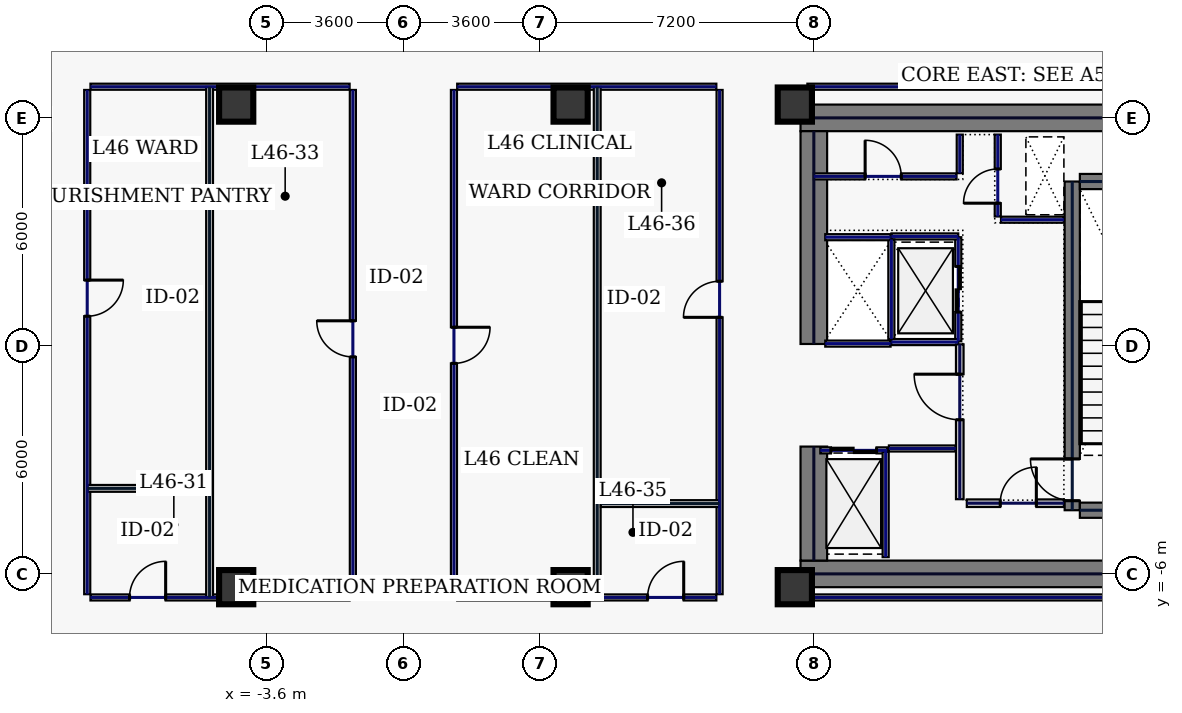
"""IFC4 building model, lengths in metres.
Left out: names, types, materials, properties, quantities, classifications, styles, units other than length and angle.
Written with IfcOpenShell. Run it as: python <this file> out.ifc"""

import sys

from ifc_helpers import new_model, si_unit, direction, frame, frame_2d, origin, origin_2d, place, context, subcontext, project, spatial, rectangle, hollow_rectangle, extrude, element, fill, save


model = new_model("IFC4")
c1 = context("Model", 3, precision=1e-05, world=origin(), true_north=direction((0.0, 1.0)))
c2 = subcontext(c1, "Body", "Model", "MODEL_VIEW")
j1 = project(units=[si_unit("LENGTHUNIT", "METRE"), si_unit("PLANEANGLEUNIT", "RADIAN")], contexts=[c1])
p1 = place(None, origin())
s1 = spatial("IfcSite", under=j1, at=p1, CompositionType="ELEMENT")
p2 = place(p1, origin())
s2 = spatial("IfcBuilding", under=s1, at=p2, CompositionType="ELEMENT")
p3 = place(p2, frame((0.0, 0.0, 200.2)))
s3 = spatial("IfcBuildingStorey", under=s2, at=p3, CompositionType="ELEMENT", Elevation=200.2)
for number, where, z_axis, x_axis in (
    (1, (10.45, 6.0, 0.0), (0.0, 0.0, 1.0), (1.0, 0.0, 0.0)),
    (2, (10.45, -6.0, 0.0), (0.0, 0.0, 1.0), (1.0, 0.0, 0.0)),
):
    element("IfcWall", number, at=place(p3, frame(where, z_axis=z_axis, x_axis=x_axis)), inside=s3, PredefinedType="SHEAR", context=c2, shape_type="SweptSolid", body=[
        extrude(rectangle(XDim=11.55, YDim=0.7, at=frame_2d((5.775, 0.0))), origin(), (0.0, 0.0, 1.0), 3.74),
    ])
p4 = place(p3, frame((10.8, -5.65, 0.0), z_axis=(0.0, 0.0, 1.0), x_axis=(0.0, 1.0, 0.0)))
e3 = element("IfcWall", 3, at=p4, inside=s3, PredefinedType="SHEAR", context=c2, shape_type="SweptSolid", body=[
    extrude(rectangle(XDim=3.0, YDim=0.7, at=frame_2d((1.5, 0.0))), origin(), (0.0, 0.0, 1.0), 3.74),
])
p5 = place(p3, frame((10.8, 0.05, 0.0), z_axis=(0.0, 0.0, 1.0), x_axis=(0.0, 1.0, 0.0)))
e4 = element("IfcWall", 4, at=p5, inside=s3, PredefinedType="SHEAR", context=c2, shape_type="SweptSolid", body=[
    extrude(rectangle(XDim=5.6, YDim=0.7, at=frame_2d((2.8, 0.0))), origin(), (0.0, 0.0, 1.0), 3.74),
])
p6 = place(p3, frame((17.6, -4.325, 0.0), z_axis=(0.0, 0.0, 1.0), x_axis=(0.0, 1.0, 0.0)))
e5 = element("IfcWall", 5, at=p6, inside=s3, PredefinedType="SHEAR", context=c2, shape_type="SweptSolid", body=[
    extrude(rectangle(XDim=8.65, YDim=0.4, at=frame_2d((4.325, 0.0))), origin(), (0.0, 0.0, 1.0), 3.74),
])
p7 = place(p6, frame((0.25, 0.0, 0.0)))
e6 = element("IfcOpeningElement", 6, at=p7, cuts=e5, PredefinedType="OPENING", context=c2, shape_type="SweptSolid", body=[
    extrude(rectangle(XDim=1.1, YDim=2.2, at=frame_2d((0.55, 1.1))), frame((0.0, 0.21, 0.0), z_axis=(0.0, -1.0, 0.0), x_axis=(1.0, 0.0, 0.0)), (0.0, 0.0, 1.0), 0.42),
])
for number, where, z_axis, x_axis in (
    (7, (17.8, -4.325, 0.0), (0.0, 0.0, 1.0), (1.0, 0.0, 0.0)),
    (8, (17.8, 4.325, 0.0), (0.0, 0.0, 1.0), (1.0, 0.0, 0.0)),
):
    element("IfcWall", number, at=place(p3, frame(where, z_axis=z_axis, x_axis=x_axis)), inside=s3, PredefinedType="SHEAR", context=c2, shape_type="SweptSolid", body=[
        extrude(rectangle(XDim=3.4, YDim=0.4, at=frame_2d((1.7, 0.0))), origin(), (0.0, 0.0, 1.0), 3.74),
    ])
for number, where, z_axis, x_axis in (
    (9, (10.3, -6.35, 0.0), (0.0, 0.0, 1.0), (1.0, 0.0, 0.0)),
    (10, (10.3, 6.35, 0.0), (0.0, 0.0, 1.0), (1.0, 0.0, 0.0)),
    (11, (-4.4, -6.35, 0.0), (0.0, 0.0, 1.0), (1.0, 0.0, 0.0)),
    (12, (4.4, -6.35, 0.0), (0.0, 0.0, 1.0), (1.0, 0.0, 0.0)),
    (13, (-4.4, 6.35, 0.0), (0.0, 0.0, 1.0), (1.0, 0.0, 0.0)),
    (14, (4.4, 6.35, 0.0), (0.0, 0.0, 1.0), (1.0, 0.0, 0.0)),
):
    element("IfcColumn", number, at=place(p3, frame(where, z_axis=z_axis, x_axis=x_axis)), inside=s3, PredefinedType="COLUMN", context=c2, shape_type="SweptSolid", body=[
        extrude(hollow_rectangle(XDim=0.9, YDim=0.9, WallThickness=0.04, at=origin_2d()), origin(), (0.0, 0.0, 1.0), 3.74),
    ])
p8 = place(p3, frame((14.6, 0.12, 0.0), z_axis=(0.0, 0.0, 1.0), x_axis=(0.0, 1.0, 0.0)))
e15 = element("IfcWall", 15, at=p8, inside=s3, PredefinedType="PARTITIONING", context=c2, shape_type="SweptSolid", body=[
    extrude(rectangle(XDim=2.74, YDim=0.16, at=frame_2d((1.37, 0.0))), origin(), (0.0, 0.0, 1.0), 3.74),
])
p9 = place(p8, frame((0.77, 0.0, 0.0)))
e16 = element("IfcOpeningElement", 16, at=p9, cuts=e15, PredefinedType="OPENING", context=c2, shape_type="SweptSolid", body=[
    extrude(rectangle(XDim=1.2, YDim=2.2, at=frame_2d((0.6, 1.1))), frame((0.0, 0.09, 0.0), z_axis=(0.0, -1.0, 0.0), x_axis=(1.0, 0.0, 0.0)), (0.0, 0.0, 1.0), 0.18),
])
for number, where, z_axis, x_axis in (
    (17, (12.84, 0.1, 0.0), (0.0, 0.0, 1.0), (1.0, 0.0, 0.0)),
    (18, (12.84, 2.88, 0.0), (0.0, 0.0, 1.0), (1.0, 0.0, 0.0)),
):
    element("IfcWall", number, at=place(p3, frame(where, z_axis=z_axis, x_axis=x_axis)), inside=s3, PredefinedType="PARTITIONING", context=c2, shape_type="SweptSolid", body=[
        extrude(rectangle(XDim=1.76, YDim=0.16, at=frame_2d((0.88, 0.0))), origin(), (0.0, 0.0, 1.0), 3.74),
    ])
p10 = place(p3, frame((12.84, 0.18, 0.0), z_axis=(0.0, 0.0, 1.0), x_axis=(0.0, 1.0, 0.0)))
e19 = element("IfcWall", 19, at=p10, inside=s3, PredefinedType="PARTITIONING", context=c2, shape_type="SweptSolid", body=[
    extrude(rectangle(XDim=2.62, YDim=0.16, at=frame_2d((1.31, 0.0))), origin(), (0.0, 0.0, 1.0), 3.74),
])
p11 = place(p3, frame((10.97, -2.75, 0.0), z_axis=(0.0, 0.0, 1.0), x_axis=(1.0, 0.0, 0.0)))
e20 = element("IfcWall", 20, at=p11, inside=s3, PredefinedType="PARTITIONING", context=c2, shape_type="SweptSolid", body=[
    extrude(rectangle(XDim=1.76, YDim=0.16, at=frame_2d((0.88, 0.0))), origin(), (0.0, 0.0, 1.0), 3.74),
])
p12 = place(p11, frame((0.28, 0.0, 0.0)))
e21 = element("IfcOpeningElement", 21, at=p12, cuts=e20, PredefinedType="OPENING", context=c2, shape_type="SweptSolid", body=[
    extrude(rectangle(XDim=1.2, YDim=2.2, at=frame_2d((0.6, 1.1))), frame((0.0, 0.09, 0.0), z_axis=(0.0, -1.0, 0.0), x_axis=(1.0, 0.0, 0.0)), (0.0, 0.0, 1.0), 0.18),
])
for number, where, z_axis, x_axis in (
    (22, (11.1, 0.06, 0.0), (0.0, 0.0, 1.0), (1.0, 0.0, 0.0)),
    (23, (11.1, 2.86, 0.0), (0.0, 0.0, 1.0), (1.0, 0.0, 0.0)),
):
    element("IfcWall", number, at=place(p3, frame(where, z_axis=z_axis, x_axis=x_axis)), inside=s3, PredefinedType="PARTITIONING", context=c2, shape_type="SweptSolid", body=[
        extrude(rectangle(XDim=1.72, YDim=0.16, at=frame_2d((0.86, 0.0))), origin(), (0.0, 0.0, 1.0), 3.74),
    ])
p13 = place(p3, frame((15.64, 3.405, 0.0), z_axis=(0.0, 0.0, 1.0), x_axis=(0.0, 1.0, 0.0)))
e24 = element("IfcWall", 24, at=p13, inside=s3, PredefinedType="PARTITIONING", context=c2, shape_type="SweptSolid", body=[
    extrude(rectangle(XDim=2.155, YDim=0.16, at=frame_2d((1.078, 0.0))), origin(), (0.0, 0.0, 1.0), 3.74),
])
p14 = place(p13, frame((0.35, 0.0, 0.0)))
e25 = element("IfcOpeningElement", 25, at=p14, cuts=e24, PredefinedType="OPENING", context=c2, shape_type="SweptSolid", body=[
    extrude(rectangle(XDim=0.9, YDim=2.2, at=frame_2d((0.45, 1.1))), frame((0.0, 0.09, 0.0), z_axis=(0.0, -1.0, 0.0), x_axis=(1.0, 0.0, 0.0)), (0.0, 0.0, 1.0), 0.18),
])
p15 = place(p3, frame((15.725, 3.32, 0.0), z_axis=(0.0, 0.0, 1.0), x_axis=(1.0, 0.0, 0.0)))
e26 = element("IfcWall", 26, at=p15, inside=s3, PredefinedType="PARTITIONING", context=c2, shape_type="SweptSolid", body=[
    extrude(rectangle(XDim=1.655, YDim=0.16, at=frame_2d((0.827, 0.0))), origin(), (0.0, 0.0, 1.0), 3.74),
])
p16 = place(p3, frame((14.825, -4.14, 0.0), z_axis=(0.0, 0.0, 1.0), x_axis=(1.0, 0.0, 0.0)))
e27 = element("IfcWall", 27, at=p16, inside=s3, PredefinedType="SOLIDWALL", context=c2, shape_type="SweptSolid", body=[
    extrude(rectangle(XDim=2.555, YDim=0.2, at=frame_2d((1.277, 0.0))), origin(), (0.0, 0.0, 1.0), 3.74),
])
p17 = place(p16, frame((0.88, 0.0, 0.0)))
e28 = element("IfcOpeningElement", 28, at=p17, cuts=e27, PredefinedType="OPENING", context=c2, shape_type="SweptSolid", body=[
    extrude(rectangle(XDim=0.95, YDim=2.2, at=frame_2d((0.475, 1.1))), frame((0.0, 0.11, 0.0), z_axis=(0.0, -1.0, 0.0), x_axis=(1.0, 0.0, 0.0)), (0.0, 0.0, 1.0), 0.22),
])
p18 = place(p3, frame((12.775, -2.7, 0.0), z_axis=(0.0, 0.0, 1.0), x_axis=(1.0, 0.0, 0.0)))
e29 = element("IfcWall", 29, at=p18, inside=s3, PredefinedType="PARTITIONING", context=c2, shape_type="SweptSolid", body=[
    extrude(rectangle(XDim=1.76, YDim=0.16, at=frame_2d((0.88, 0.0))), origin(), (0.0, 0.0, 1.0), 3.74),
])
p19 = place(p3, frame((12.69, -5.56, 0.0), z_axis=(0.0, 0.0, 1.0), x_axis=(0.0, 1.0, 0.0)))
e30 = element("IfcWall", 30, at=p19, inside=s3, PredefinedType="PARTITIONING", context=c2, shape_type="SweptSolid", body=[
    extrude(rectangle(XDim=2.775, YDim=0.16, at=frame_2d((1.388, 0.0))), origin(), (0.0, 0.0, 1.0), 3.74),
])
p20 = place(p3, frame((10.8, 4.46, 0.0), z_axis=(0.0, 0.0, 1.0), x_axis=(1.0, 0.0, 0.0)))
e31 = element("IfcWall", 31, at=p20, inside=s3, PredefinedType="PARTITIONING", context=c2, shape_type="SweptSolid", body=[
    extrude(rectangle(XDim=3.755, YDim=0.16, at=frame_2d((1.877, 0.0))), origin(), (0.0, 0.0, 1.0), 3.74),
])
p21 = place(p20, frame((1.35, 0.0, 0.0)))
e32 = element("IfcOpeningElement", 32, at=p21, cuts=e31, PredefinedType="OPENING", context=c2, shape_type="SweptSolid", body=[
    extrude(rectangle(XDim=0.95, YDim=2.2, at=frame_2d((0.475, 1.1))), frame((0.0, 0.09, 0.0), z_axis=(0.0, -1.0, 0.0), x_axis=(1.0, 0.0, 0.0)), (0.0, 0.0, 1.0), 0.18),
])
p22 = place(p3, frame((14.64, 4.545, 0.0), z_axis=(0.0, 0.0, 1.0), x_axis=(0.0, 1.0, 0.0)))
e33 = element("IfcWall", 33, at=p22, inside=s3, PredefinedType="PARTITIONING", context=c2, shape_type="SweptSolid", body=[
    extrude(rectangle(XDim=1.015, YDim=0.16, at=frame_2d((0.508, 0.0))), origin(), (0.0, 0.0, 1.0), 3.74),
])
p23 = place(p3, frame((14.64, -4.035, 0.0), z_axis=(0.0, 0.0, 1.0), x_axis=(0.0, 1.0, 0.0)))
e34 = element("IfcWall", 34, at=p23, inside=s3, PredefinedType="SOLIDWALL", context=c2, shape_type="SweptSolid", body=[
    extrude(rectangle(XDim=4.075, YDim=0.2, at=frame_2d((2.038, 0.0))), origin(), (0.0, 0.0, 1.0), 3.74),
])
p24 = place(p23, frame((2.09, 0.0, 0.0)))
e35 = element("IfcOpeningElement", 35, at=p24, cuts=e34, PredefinedType="OPENING", context=c2, shape_type="SweptSolid", body=[
    extrude(rectangle(XDim=1.2, YDim=2.2, at=frame_2d((0.6, 1.1))), frame((0.0, 0.11, 0.0), z_axis=(0.0, -1.0, 0.0), x_axis=(1.0, 0.0, 0.0)), (0.0, 0.0, 1.0), 0.22),
])
for number, where, z_axis, x_axis in (
    (36, (24.965, 6.82, 0.0), (0.0, 0.0, 1.0), (-1.0, 0.0, 0.0)),
    (37, (10.63, -6.62, 0.0), (0.0, 0.0, 1.0), (1.0, 0.0, 0.0)),
):
    element("IfcWall", number, at=place(p3, frame(where, z_axis=z_axis, x_axis=x_axis)), inside=s3, PredefinedType="PARTITIONING", context=c2, shape_type="SweptSolid", body=[
        extrude(rectangle(XDim=14.335, YDim=0.16, at=frame_2d((7.167, 0.0))), origin(), (0.0, 0.0, 1.0), 3.74),
    ])
p25 = place(p3, frame((8.235, 6.82, 0.0), z_axis=(0.0, 0.0, 1.0), x_axis=(-1.0, 0.0, 0.0)))
e38 = element("IfcWall", 38, at=p25, inside=s3, PredefinedType="PARTITIONING", context=c2, shape_type="SweptSolid", body=[
    extrude(rectangle(XDim=6.82, YDim=0.16, at=frame_2d((3.41, 0.0))), origin(), (0.0, 0.0, 1.0), 3.74),
])
p26 = place(p3, frame((1.33, 6.735, 0.0), z_axis=(0.0, 0.0, 1.0), x_axis=(0.0, -1.0, 0.0)))
e39 = element("IfcWall", 39, at=p26, inside=s3, PredefinedType="PARTITIONING", context=c2, shape_type="SweptSolid", body=[
    extrude(rectangle(XDim=13.27, YDim=0.16, at=frame_2d((6.635, 0.0))), origin(), (0.0, 0.0, 1.0), 3.74),
])
p27 = place(p26, frame((6.245, 0.0, 0.0)))
e40 = element("IfcOpeningElement", 40, at=p27, cuts=e39, PredefinedType="OPENING", context=c2, shape_type="SweptSolid", body=[
    extrude(rectangle(XDim=0.95, YDim=2.2, at=frame_2d((0.475, 1.1))), frame((0.0, 0.09, 0.0), z_axis=(0.0, -1.0, 0.0), x_axis=(1.0, 0.0, 0.0)), (0.0, 0.0, 1.0), 0.18),
])
p28 = place(p3, frame((1.415, -6.62, 0.0), z_axis=(0.0, 0.0, 1.0), x_axis=(1.0, 0.0, 0.0)))
e41 = element("IfcWall", 41, at=p28, inside=s3, PredefinedType="PARTITIONING", context=c2, shape_type="SweptSolid", body=[
    extrude(rectangle(XDim=6.82, YDim=0.16, at=frame_2d((3.41, 0.0))), origin(), (0.0, 0.0, 1.0), 3.74),
])
p29 = place(p28, frame((5.011, 0.0, 0.0)))
e42 = element("IfcOpeningElement", 42, at=p29, cuts=e41, PredefinedType="OPENING", context=c2, shape_type="SweptSolid", body=[
    extrude(rectangle(XDim=0.95, YDim=2.2, at=frame_2d((0.475, 1.1))), frame((0.0, 0.09, 0.0), z_axis=(0.0, -1.0, 0.0), x_axis=(1.0, 0.0, 0.0)), (0.0, 0.0, 1.0), 0.18),
])
p30 = place(p3, frame((8.32, -6.535, 0.0), z_axis=(0.0, 0.0, 1.0), x_axis=(0.0, 1.0, 0.0)))
e43 = element("IfcWall", 43, at=p30, inside=s3, PredefinedType="PARTITIONING", context=c2, shape_type="SweptSolid", body=[
    extrude(rectangle(XDim=13.27, YDim=0.16, at=frame_2d((6.635, 0.0))), origin(), (0.0, 0.0, 1.0), 3.74),
])
p31 = place(p30, frame((7.286, 0.0, 0.0)))
e44 = element("IfcOpeningElement", 44, at=p31, cuts=e43, PredefinedType="OPENING", context=c2, shape_type="SweptSolid", body=[
    extrude(rectangle(XDim=0.95, YDim=2.2, at=frame_2d((0.475, 1.1))), frame((0.0, 0.09, 0.0), z_axis=(0.0, -1.0, 0.0), x_axis=(1.0, 0.0, 0.0)), (0.0, 0.0, 1.0), 0.18),
])
p32 = place(p3, frame((-1.33, -6.535, 0.0), z_axis=(0.0, 0.0, 1.0), x_axis=(0.0, 1.0, 0.0)))
e45 = element("IfcWall", 45, at=p32, inside=s3, PredefinedType="PARTITIONING", context=c2, shape_type="SweptSolid", body=[
    extrude(rectangle(XDim=13.27, YDim=0.16, at=frame_2d((6.635, 0.0))), origin(), (0.0, 0.0, 1.0), 3.74),
])
p33 = place(p32, frame((6.245, 0.0, 0.0)))
e46 = element("IfcOpeningElement", 46, at=p33, cuts=e45, PredefinedType="OPENING", context=c2, shape_type="SweptSolid", body=[
    extrude(rectangle(XDim=0.95, YDim=2.2, at=frame_2d((0.475, 1.1))), frame((0.0, 0.09, 0.0), z_axis=(0.0, -1.0, 0.0), x_axis=(1.0, 0.0, 0.0)), (0.0, 0.0, 1.0), 0.18),
])
p34 = place(p3, frame((-1.415, 6.82, 0.0), z_axis=(0.0, 0.0, 1.0), x_axis=(-1.0, 0.0, 0.0)))
e47 = element("IfcWall", 47, at=p34, inside=s3, PredefinedType="PARTITIONING", context=c2, shape_type="SweptSolid", body=[
    extrude(rectangle(XDim=6.82, YDim=0.16, at=frame_2d((3.41, 0.0))), origin(), (0.0, 0.0, 1.0), 3.74),
])
p35 = place(p3, frame((-8.32, 6.735, 0.0), z_axis=(0.0, 0.0, 1.0), x_axis=(0.0, -1.0, 0.0)))
e48 = element("IfcWall", 48, at=p35, inside=s3, PredefinedType="PARTITIONING", context=c2, shape_type="SweptSolid", body=[
    extrude(rectangle(XDim=13.27, YDim=0.16, at=frame_2d((6.635, 0.0))), origin(), (0.0, 0.0, 1.0), 3.74),
])
p36 = place(p35, frame((5.004, 0.0, 0.0)))
e49 = element("IfcOpeningElement", 49, at=p36, cuts=e48, PredefinedType="OPENING", context=c2, shape_type="SweptSolid", body=[
    extrude(rectangle(XDim=0.95, YDim=2.2, at=frame_2d((0.475, 1.1))), frame((0.0, 0.09, 0.0), z_axis=(0.0, -1.0, 0.0), x_axis=(1.0, 0.0, 0.0)), (0.0, 0.0, 1.0), 0.18),
])
p37 = place(p3, frame((-8.235, -6.62, 0.0), z_axis=(0.0, 0.0, 1.0), x_axis=(1.0, 0.0, 0.0)))
e50 = element("IfcWall", 50, at=p37, inside=s3, PredefinedType="PARTITIONING", context=c2, shape_type="SweptSolid", body=[
    extrude(rectangle(XDim=6.82, YDim=0.16, at=frame_2d((3.41, 0.0))), origin(), (0.0, 0.0, 1.0), 3.74),
])
p38 = place(p37, frame((1.029, 0.0, 0.0)))
e51 = element("IfcOpeningElement", 51, at=p38, cuts=e50, PredefinedType="OPENING", context=c2, shape_type="SweptSolid", body=[
    extrude(rectangle(XDim=0.95, YDim=2.2, at=frame_2d((0.475, 1.1))), frame((0.0, 0.09, 0.0), z_axis=(0.0, -1.0, 0.0), x_axis=(1.0, 0.0, 0.0)), (0.0, 0.0, 1.0), 0.18),
])
for number, where, z_axis, x_axis in (
    (52, (-5.1, -6.615, 0.0), (0.0, 0.0, 1.0), (0.0, 1.0, 0.0)),
    (53, (5.1, -6.615, 0.0), (0.0, 0.0, 1.0), (0.0, 1.0, 0.0)),
):
    element("IfcWall", number, at=place(p3, frame(where, z_axis=z_axis, x_axis=x_axis)), inside=s3, PredefinedType="PARTITIONING", context=c2, shape_type="SweptSolid", body=[
        extrude(rectangle(XDim=13.43, YDim=0.18, at=frame_2d((6.715, 0.0))), origin(), (0.0, 0.0, 1.0), 3.74),
    ])
for number, where, z_axis, x_axis in (
    (54, (-8.315, -3.75, 0.0), (0.0, 0.0, 1.0), (1.0, 0.0, 0.0)),
    (55, (5.195, -4.15, 0.0), (0.0, 0.0, 1.0), (1.0, 0.0, 0.0)),
):
    element("IfcWall", number, at=place(p3, frame(where, z_axis=z_axis, x_axis=x_axis)), inside=s3, PredefinedType="PARTITIONING", context=c2, shape_type="SweptSolid", body=[
        extrude(rectangle(XDim=3.12, YDim=0.18, at=frame_2d((1.56, 0.0))), origin(), (0.0, 0.0, 1.0), 3.74),
    ])
p39 = place(p7, origin())
e56 = element("IfcDoor", 56, at=p39, inside=s3, OperationType="SINGLE_SWING_RIGHT", PredefinedType="DOOR", context=c2, shape_type="SweptSolid", body=[
    extrude(rectangle(XDim=1.1, YDim=2.2, at=frame_2d((0.55, 1.1))), frame((0.0, 0.025, 0.0), z_axis=(0.0, -1.0, 0.0), x_axis=(1.0, 0.0, 0.0)), (0.0, 0.0, 1.0), 0.05),
])
fill(e6, e56)
p40 = place(p9, origin())
e57 = element("IfcDoor", 57, at=p40, inside=s3, OperationType="SLIDING_TO_LEFT", PredefinedType="DOOR", context=c2, shape_type="SweptSolid", body=[
    extrude(rectangle(XDim=1.2, YDim=2.2, at=frame_2d((0.6, 1.1))), frame((0.0, 0.025, 0.0), z_axis=(0.0, -1.0, 0.0), x_axis=(1.0, 0.0, 0.0)), (0.0, 0.0, 1.0), 0.05),
])
fill(e16, e57)
p41 = place(p12, origin())
e58 = element("IfcDoor", 58, at=p41, inside=s3, OperationType="SLIDING_TO_LEFT", PredefinedType="DOOR", context=c2, shape_type="SweptSolid", body=[
    extrude(rectangle(XDim=1.2, YDim=2.2, at=frame_2d((0.6, 1.1))), frame((0.0, 0.025, 0.0), z_axis=(0.0, -1.0, 0.0), x_axis=(1.0, 0.0, 0.0)), (0.0, 0.0, 1.0), 0.05),
])
fill(e21, e58)
p42 = place(p14, origin())
e59 = element("IfcDoor", 59, at=p42, inside=s3, OperationType="SINGLE_SWING_LEFT", PredefinedType="DOOR", context=c2, shape_type="SweptSolid", body=[
    extrude(rectangle(XDim=0.9, YDim=2.2, at=frame_2d((0.45, 1.1))), frame((0.0, 0.025, 0.0), z_axis=(0.0, -1.0, 0.0), x_axis=(1.0, 0.0, 0.0)), (0.0, 0.0, 1.0), 0.05),
])
fill(e25, e59)
p43 = place(p17, origin())
e60 = element("IfcDoor", 60, at=p43, inside=s3, OperationType="SINGLE_SWING_RIGHT", PredefinedType="DOOR", context=c2, shape_type="SweptSolid", body=[
    extrude(rectangle(XDim=0.95, YDim=2.2, at=frame_2d((0.475, 1.1))), frame((0.0, 0.025, 0.0), z_axis=(0.0, -1.0, 0.0), x_axis=(1.0, 0.0, 0.0)), (0.0, 0.0, 1.0), 0.05),
])
fill(e28, e60)
p44 = place(p21, origin())
e61 = element("IfcDoor", 61, at=p44, inside=s3, OperationType="SINGLE_SWING_LEFT", PredefinedType="DOOR", context=c2, shape_type="SweptSolid", body=[
    extrude(rectangle(XDim=0.95, YDim=2.2, at=frame_2d((0.475, 1.1))), frame((0.0, 0.025, 0.0), z_axis=(0.0, -1.0, 0.0), x_axis=(1.0, 0.0, 0.0)), (0.0, 0.0, 1.0), 0.05),
])
fill(e32, e61)
p45 = place(p24, origin())
e62 = element("IfcDoor", 62, at=p45, inside=s3, OperationType="SINGLE_SWING_RIGHT", PredefinedType="DOOR", context=c2, shape_type="SweptSolid", body=[
    extrude(rectangle(XDim=1.2, YDim=2.2, at=frame_2d((0.6, 1.1))), frame((0.0, 0.025, 0.0), z_axis=(0.0, -1.0, 0.0), x_axis=(1.0, 0.0, 0.0)), (0.0, 0.0, 1.0), 0.05),
])
fill(e35, e62)
p46 = place(p38, origin())
e63 = element("IfcDoor", 63, at=p46, inside=s3, OperationType="SINGLE_SWING_RIGHT", PredefinedType="DOOR", context=c2, shape_type="SweptSolid", body=[
    extrude(rectangle(XDim=0.95, YDim=2.2, at=frame_2d((0.475, 1.1))), frame((0.0, 0.025, 0.0), z_axis=(0.0, -1.0, 0.0), x_axis=(1.0, 0.0, 0.0)), (0.0, 0.0, 1.0), 0.05),
])
fill(e51, e63)
p47 = place(p36, origin())
e64 = element("IfcDoor", 64, at=p47, inside=s3, OperationType="SINGLE_SWING_LEFT", PredefinedType="DOOR", context=c2, shape_type="SweptSolid", body=[
    extrude(rectangle(XDim=0.95, YDim=2.2, at=frame_2d((0.475, 1.1))), frame((0.0, 0.025, 0.0), z_axis=(0.0, -1.0, 0.0), x_axis=(1.0, 0.0, 0.0)), (0.0, 0.0, 1.0), 0.05),
])
fill(e49, e64)
p48 = place(p33, origin())
e65 = element("IfcDoor", 65, at=p48, inside=s3, OperationType="SINGLE_SWING_RIGHT", PredefinedType="DOOR", context=c2, shape_type="SweptSolid", body=[
    extrude(rectangle(XDim=0.95, YDim=2.2, at=frame_2d((0.475, 1.1))), frame((0.0, 0.025, 0.0), z_axis=(0.0, -1.0, 0.0), x_axis=(1.0, 0.0, 0.0)), (0.0, 0.0, 1.0), 0.05),
])
fill(e46, e65)
p49 = place(p27, origin())
e66 = element("IfcDoor", 66, at=p49, inside=s3, OperationType="SINGLE_SWING_LEFT", PredefinedType="DOOR", context=c2, shape_type="SweptSolid", body=[
    extrude(rectangle(XDim=0.95, YDim=2.2, at=frame_2d((0.475, 1.1))), frame((0.0, 0.025, 0.0), z_axis=(0.0, -1.0, 0.0), x_axis=(1.0, 0.0, 0.0)), (0.0, 0.0, 1.0), 0.05),
])
fill(e40, e66)
p50 = place(p29, origin())
e67 = element("IfcDoor", 67, at=p50, inside=s3, OperationType="SINGLE_SWING_RIGHT", PredefinedType="DOOR", context=c2, shape_type="SweptSolid", body=[
    extrude(rectangle(XDim=0.95, YDim=2.2, at=frame_2d((0.475, 1.1))), frame((0.0, 0.025, 0.0), z_axis=(0.0, -1.0, 0.0), x_axis=(1.0, 0.0, 0.0)), (0.0, 0.0, 1.0), 0.05),
])
fill(e42, e67)
p51 = place(p31, origin())
e68 = element("IfcDoor", 68, at=p51, inside=s3, OperationType="SINGLE_SWING_LEFT", PredefinedType="DOOR", context=c2, shape_type="SweptSolid", body=[
    extrude(rectangle(XDim=0.95, YDim=2.2, at=frame_2d((0.475, 1.1))), frame((0.0, 0.025, 0.0), z_axis=(0.0, -1.0, 0.0), x_axis=(1.0, 0.0, 0.0)), (0.0, 0.0, 1.0), 0.05),
])
fill(e44, e68)
save(model, sys.argv[1])
